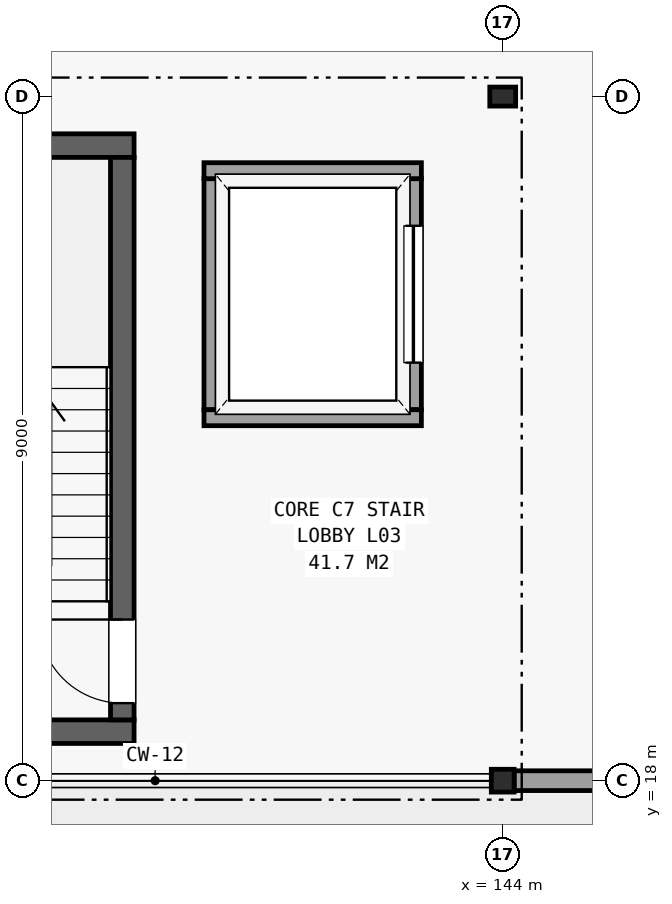
"""IFC4 building model, lengths in metres.
Left out: names, types, materials, properties, quantities, classifications, styles, units other than length and angle.
Written with IfcOpenShell. Run it as: python <this file> out.ifc"""

import sys

from ifc_helpers import new_model, si_unit, direction, frame, frame_2d, origin, origin_2d, place, context, subcontext, project, spatial, rectangle, hollow_rectangle, i_section, extrude, element, fill, save


model = new_model("IFC4")
c1 = context("Model", 3, precision=1e-05, world=origin(), true_north=direction((0.0, 1.0)))
c2 = subcontext(c1, "Body", "Model", "MODEL_VIEW")
j1 = project(units=[si_unit("LENGTHUNIT", "METRE"), si_unit("PLANEANGLEUNIT", "RADIAN")], contexts=[c1])
p1 = place(None, origin())
s1 = spatial("IfcSite", under=j1, at=p1, CompositionType="ELEMENT")
p2 = place(p1, origin())
s2 = spatial("IfcBuilding", under=s1, at=p2, CompositionType="ELEMENT")
p3 = place(p2, frame((0.0, 0.0, 13.5)))
s3 = spatial("IfcBuildingStorey", under=s2, at=p3, CompositionType="ELEMENT", Elevation=13.5)
p4 = place(p3, frame((144.0, 18.0, 0.0), z_axis=(0.0, 0.0, 1.0), x_axis=(1.0, 0.0, 0.0)))
e1 = element("IfcColumn", 1, at=p4, inside=s3, PredefinedType="COLUMN", context=c2, shape_type="SweptSolid", body=[
    extrude(hollow_rectangle(XDim=0.3, YDim=0.3, WallThickness=0.012, at=origin_2d()), origin(), (0.0, 0.0, 1.0), 4.2),
])
p5 = place(p3, frame((144.0, 27.0, 0.0), z_axis=(0.0, 0.0, 1.0), x_axis=(1.0, 0.0, 0.0)))
e2 = element("IfcColumn", 2, at=p5, inside=s3, PredefinedType="COLUMN", context=c2, shape_type="SweptSolid", body=[
    extrude(i_section(OverallWidth=0.25, OverallDepth=0.34, WebThickness=0.009, FlangeThickness=0.014, FilletRadius=0.01, at=origin_2d()), origin(), (0.0, 0.0, 1.0), 4.2),
])
p6 = place(p3, frame((144.15, 18.0, 0.0), z_axis=(0.0, 0.0, 1.0), x_axis=(1.0, 0.0, 0.0)))
e3 = element("IfcWall", 3, at=p6, inside=s3, PredefinedType="SOLIDWALL", context=c2, shape_type="SweptSolid", body=[
    extrude(rectangle(XDim=8.846, YDim=0.26, at=frame_2d((4.423, 0.0))), origin(), (0.0, 0.0, 1.0), 3.29),
])
for number, where, z_axis, x_axis in (
    (4, (135.25, 18.645, 0.0), (0.0, 0.0, 1.0), (1.0, 0.0, 0.0)),
    (5, (135.25, 26.355, 0.0), (0.0, 0.0, 1.0), (1.0, 0.0, 0.0)),
):
    element("IfcWall", number, at=place(p3, frame(where, z_axis=z_axis, x_axis=x_axis)), inside=s3, PredefinedType="SHEAR", context=c2, shape_type="SweptSolid", body=[
        extrude(rectangle(XDim=3.9, YDim=0.31, at=frame_2d((1.95, 0.0))), origin(), (0.0, 0.0, 1.0), 3.94),
    ])
p7 = place(p3, frame((138.995, 18.8, 0.0), z_axis=(0.0, 0.0, 1.0), x_axis=(0.0, 1.0, 0.0)))
e6 = element("IfcWall", 6, at=p7, inside=s3, PredefinedType="SHEAR", context=c2, shape_type="SweptSolid", body=[
    extrude(rectangle(XDim=7.4, YDim=0.31, at=frame_2d((3.7, 0.0))), origin(), (0.0, 0.0, 1.0), 3.94),
])
p8 = place(p7, frame((0.22, 0.0, 0.0)))
e7 = element("IfcOpeningElement", 7, at=p8, cuts=e6, PredefinedType="OPENING", context=c2, shape_type="SweptSolid", body=[
    extrude(rectangle(XDim=1.1, YDim=2.15, at=frame_2d((0.55, 1.075))), frame((0.0, 0.166, 0.0), z_axis=(0.0, -1.0, 0.0), x_axis=(1.0, 0.0, 0.0)), (0.0, 0.0, 1.0), 0.332),
])
p9 = place(p3, frame((142.825, 22.88, 0.0), z_axis=(0.0, 0.0, 1.0), x_axis=(0.0, 1.0, 0.0)))
e8 = element("IfcWall", 8, at=p9, inside=s3, PredefinedType="PARTITIONING", context=c2, shape_type="SweptSolid", body=[
    extrude(rectangle(XDim=3.04, YDim=0.21, at=frame_2d((1.52, 0.0))), origin(), (0.0, 0.0, 1.0), 3.94),
])
p10 = place(p9, frame((0.62, 0.0, 0.0)))
e9 = element("IfcOpeningElement", 9, at=p10, cuts=e8, PredefinedType="OPENING", context=c2, shape_type="SweptSolid", body=[
    extrude(rectangle(XDim=1.8, YDim=2.4, at=frame_2d((0.9, 1.2))), frame((0.0, 0.116, 0.0), z_axis=(0.0, -1.0, 0.0), x_axis=(1.0, 0.0, 0.0)), (0.0, 0.0, 1.0), 0.232),
])
p11 = place(p3, frame((140.175, 22.88, 0.0), z_axis=(0.0, 0.0, 1.0), x_axis=(0.0, 1.0, 0.0)))
e10 = element("IfcWall", 10, at=p11, inside=s3, PredefinedType="PARTITIONING", context=c2, shape_type="SweptSolid", body=[
    extrude(rectangle(XDim=3.04, YDim=0.21, at=frame_2d((1.52, 0.0))), origin(), (0.0, 0.0, 1.0), 3.94),
])
for number, where, z_axis, x_axis in (
    (11, (140.07, 22.775, 0.0), (0.0, 0.0, 1.0), (1.0, 0.0, 0.0)),
    (12, (140.07, 26.025, 0.0), (0.0, 0.0, 1.0), (1.0, 0.0, 0.0)),
):
    element("IfcWall", number, at=place(p3, frame(where, z_axis=z_axis, x_axis=x_axis)), inside=s3, PredefinedType="PARTITIONING", context=c2, shape_type="SweptSolid", body=[
        extrude(rectangle(XDim=2.86, YDim=0.21, at=frame_2d((1.43, 0.0))), origin(), (0.0, 0.0, 1.0), 3.94),
    ])
p12 = place(p8, origin())
e13 = element("IfcDoor", 13, at=p12, inside=s3, OperationType="SINGLE_SWING_RIGHT", PredefinedType="DOOR", context=c2, shape_type="SweptSolid", body=[
    extrude(rectangle(XDim=1.1, YDim=2.15, at=frame_2d((0.55, 1.075))), frame((0.0, 0.025, 0.0), z_axis=(0.0, -1.0, 0.0), x_axis=(1.0, 0.0, 0.0)), (0.0, 0.0, 1.0), 0.05),
])
fill(e7, e13)
p13 = place(p10, origin())
e14 = element("IfcDoor", 14, at=p13, inside=s3, OperationType="SLIDING_TO_LEFT", PredefinedType="DOOR", context=c2, shape_type="SweptSolid", body=[
    extrude(rectangle(XDim=1.8, YDim=2.4, at=frame_2d((0.9, 1.2))), frame((0.0, 0.025, 0.0), z_axis=(0.0, -1.0, 0.0), x_axis=(1.0, 0.0, 0.0)), (0.0, 0.0, 1.0), 0.05),
])
fill(e9, e14)
save(model, sys.argv[1])
